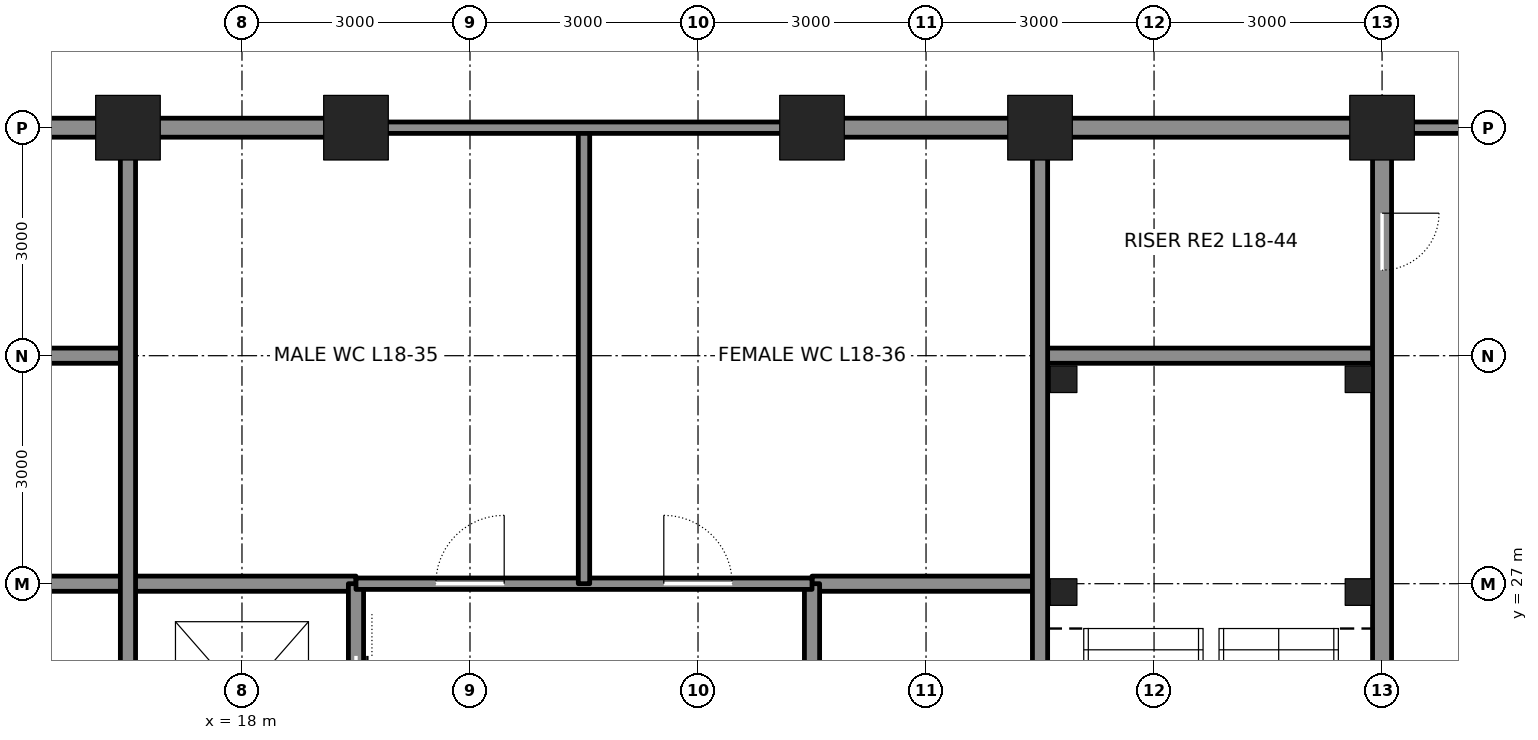
"""IFC4 building model, lengths in metres.
Left out: names, types, materials, properties, quantities, classifications, styles, units other than length and angle.
Written with IfcOpenShell. Run it as: python <this file> out.ifc"""

import sys

from ifc_helpers import new_model, si_unit, direction, frame, frame_2d, origin, origin_2d, place, context, subcontext, project, spatial, rectangle, hollow_rectangle, extrude, element, fill, save


model = new_model("IFC4")
c1 = context("Model", 3, precision=1e-05, world=origin(), true_north=direction((0.0, 1.0)))
c2 = subcontext(c1, "Body", "Model", "MODEL_VIEW")
j1 = project(units=[si_unit("LENGTHUNIT", "METRE"), si_unit("PLANEANGLEUNIT", "RADIAN")], contexts=[c1])
p1 = place(None, origin())
s1 = spatial("IfcSite", under=j1, at=p1, CompositionType="ELEMENT")
p2 = place(p1, origin())
s2 = spatial("IfcBuilding", under=s1, at=p2, CompositionType="ELEMENT")
p3 = place(p2, frame((0.0, 0.0, 87.3)))
s3 = spatial("IfcBuildingStorey", under=s2, at=p3, CompositionType="ELEMENT", Elevation=87.3)
for number, where, z_axis, x_axis in (
    (1, (16.5, 33.0, 0.0), (0.0, 0.0, 1.0), (1.0, 0.0, 0.0)),
    (2, (19.5, 33.0, 0.0), (0.0, 0.0, 1.0), (1.0, 0.0, 0.0)),
    (3, (25.5, 33.0, 0.0), (0.0, 0.0, 1.0), (1.0, 0.0, 0.0)),
    (4, (28.5, 33.0, 0.0), (0.0, 0.0, 1.0), (1.0, 0.0, 0.0)),
    (5, (33.0, 33.0, 0.0), (0.0, 0.0, 1.0), (1.0, 0.0, 0.0)),
):
    element("IfcColumn", number, at=place(p3, frame(where, z_axis=z_axis, x_axis=x_axis)), inside=s3, PredefinedType="COLUMN", context=c2, shape_type="SweptSolid", body=[
        extrude(hollow_rectangle(XDim=0.85, YDim=0.85, WallThickness=0.085, at=origin_2d()), origin(), (0.0, 0.0, 1.0), 4.5),
    ])
p4 = place(p3, frame((12.0, 27.0, 0.0), z_axis=(0.0, 0.0, 1.0), x_axis=(1.0, 0.0, 0.0)))
e6 = element("IfcWall", 6, at=p4, inside=s3, PredefinedType="SOLIDWALL", context=c2, shape_type="SweptSolid", body=[
    extrude(rectangle(XDim=7.5, YDim=0.2, at=frame_2d((3.75, 0.0))), origin(), (0.0, 0.0, 1.0), 4.34),
])
p5 = place(p4, frame((1.65, 0.0, 0.0)))
e7 = element("IfcOpeningElement", 7, at=p5, cuts=e6, PredefinedType="OPENING", context=c2, shape_type="SweptSolid", body=[
    extrude(rectangle(XDim=1.2, YDim=2.1, at=frame_2d((0.6, 1.05))), frame((0.0, 0.11, 0.0), z_axis=(0.0, -1.0, 0.0), x_axis=(1.0, 0.0, 0.0)), (0.0, 0.0, 1.0), 0.22),
])
p6 = place(p3, frame((25.5, 27.0, 0.0), z_axis=(0.0, 0.0, 1.0), x_axis=(1.0, 0.0, 0.0)))
e8 = element("IfcWall", 8, at=p6, inside=s3, PredefinedType="SOLIDWALL", context=c2, shape_type="SweptSolid", body=[
    extrude(rectangle(XDim=3.0, YDim=0.2, at=frame_2d((1.5, 0.0))), origin(), (0.0, 0.0, 1.0), 4.34),
])
for number, where, z_axis, x_axis in (
    (9, (12.0, 30.0, 0.0), (0.0, 0.0, 1.0), (1.0, 0.0, 0.0)),
    (10, (28.5, 30.0, 0.0), (0.0, 0.0, 1.0), (1.0, 0.0, 0.0)),
):
    element("IfcWall", number, at=place(p3, frame(where, z_axis=z_axis, x_axis=x_axis)), inside=s3, PredefinedType="SOLIDWALL", context=c2, shape_type="SweptSolid", body=[
        extrude(rectangle(XDim=4.5, YDim=0.2, at=frame_2d((2.25, 0.0))), origin(), (0.0, 0.0, 1.0), 4.34),
    ])
p7 = place(p3, frame((12.25, 33.0, 0.0), z_axis=(0.0, 0.0, 1.0), x_axis=(1.0, 0.0, 0.0)))
e11 = element("IfcWall", 11, at=p7, inside=s3, PredefinedType="SOLIDWALL", context=c2, shape_type="SweptSolid", body=[
    extrude(rectangle(XDim=4.0, YDim=0.25, at=frame_2d((2.0, 0.0))), origin(), (0.0, 0.0, 1.0), 3.181),
])
for number, where, z_axis, x_axis in (
    (12, (16.75, 33.0, 0.0), (0.0, 0.0, 1.0), (1.0, 0.0, 0.0)),
    (13, (25.75, 33.0, 0.0), (0.0, 0.0, 1.0), (1.0, 0.0, 0.0)),
):
    element("IfcWall", number, at=place(p3, frame(where, z_axis=z_axis, x_axis=x_axis)), inside=s3, PredefinedType="SOLIDWALL", context=c2, shape_type="SweptSolid", body=[
        extrude(rectangle(XDim=2.5, YDim=0.25, at=frame_2d((1.25, 0.0))), origin(), (0.0, 0.0, 1.0), 3.181),
    ])
p8 = place(p3, frame((28.75, 33.0, 0.0), z_axis=(0.0, 0.0, 1.0), x_axis=(1.0, 0.0, 0.0)))
e14 = element("IfcWall", 14, at=p8, inside=s3, PredefinedType="SOLIDWALL", context=c2, shape_type="SweptSolid", body=[
    extrude(rectangle(XDim=4.0, YDim=0.25, at=frame_2d((2.0, 0.0))), origin(), (0.0, 0.0, 1.0), 3.181),
])
p9 = place(p3, frame((16.5, 24.25, 0.0), z_axis=(0.0, 0.0, 1.0), x_axis=(0.0, 1.0, 0.0)))
e15 = element("IfcWall", 15, at=p9, inside=s3, PredefinedType="SOLIDWALL", context=c2, shape_type="SweptSolid", body=[
    extrude(rectangle(XDim=8.5, YDim=0.2, at=frame_2d((4.25, 0.0))), origin(), (0.0, 0.0, 1.0), 3.413),
])
p10 = place(p3, frame((19.5, 15.0, 0.0), z_axis=(0.0, 0.0, 1.0), x_axis=(0.0, 1.0, 0.0)))
e16 = element("IfcWall", 16, at=p10, inside=s3, PredefinedType="SOLIDWALL", context=c2, shape_type="SweptSolid", body=[
    extrude(rectangle(XDim=12.0, YDim=0.2, at=frame_2d((6.0, 0.0))), origin(), (0.0, 0.0, 1.0), 3.365),
])
p11 = place(p10, frame((0.95, 0.0, 0.0)))
e17 = element("IfcOpeningElement", 17, at=p11, cuts=e16, PredefinedType="OPENING", context=c2, shape_type="SweptSolid", body=[
    extrude(rectangle(XDim=1.1, YDim=2.1, at=frame_2d((0.55, 1.05))), frame((0.0, 0.11, 0.0), z_axis=(0.0, -1.0, 0.0), x_axis=(1.0, 0.0, 0.0)), (0.0, 0.0, 1.0), 0.22),
])
p12 = place(p10, frame((3.95, 0.0, 0.0)))
e18 = element("IfcOpeningElement", 18, at=p12, cuts=e16, PredefinedType="OPENING", context=c2, shape_type="SweptSolid", body=[
    extrude(rectangle(XDim=1.1, YDim=2.1, at=frame_2d((0.55, 1.05))), frame((0.0, 0.11, 0.0), z_axis=(0.0, -1.0, 0.0), x_axis=(1.0, 0.0, 0.0)), (0.0, 0.0, 1.0), 0.22),
])
p13 = place(p10, frame((6.95, 0.0, 0.0)))
e19 = element("IfcOpeningElement", 19, at=p13, cuts=e16, PredefinedType="OPENING", context=c2, shape_type="SweptSolid", body=[
    extrude(rectangle(XDim=1.1, YDim=2.1, at=frame_2d((0.55, 1.05))), frame((0.0, 0.11, 0.0), z_axis=(0.0, -1.0, 0.0), x_axis=(1.0, 0.0, 0.0)), (0.0, 0.0, 1.0), 0.22),
])
p14 = place(p10, frame((9.95, 0.0, 0.0)))
e20 = element("IfcOpeningElement", 20, at=p14, cuts=e16, PredefinedType="OPENING", context=c2, shape_type="SweptSolid", body=[
    extrude(rectangle(XDim=1.1, YDim=2.1, at=frame_2d((0.55, 1.05))), frame((0.0, 0.11, 0.0), z_axis=(0.0, -1.0, 0.0), x_axis=(1.0, 0.0, 0.0)), (0.0, 0.0, 1.0), 0.22),
])
p15 = place(p3, frame((25.5, 15.0, 0.0), z_axis=(0.0, 0.0, 1.0), x_axis=(0.0, 1.0, 0.0)))
e21 = element("IfcWall", 21, at=p15, inside=s3, PredefinedType="SOLIDWALL", context=c2, shape_type="SweptSolid", body=[
    extrude(rectangle(XDim=12.0, YDim=0.2, at=frame_2d((6.0, 0.0))), origin(), (0.0, 0.0, 1.0), 3.365),
])
p16 = place(p3, frame((28.5, 24.25, 0.0), z_axis=(0.0, 0.0, 1.0), x_axis=(0.0, 1.0, 0.0)))
e22 = element("IfcWall", 22, at=p16, inside=s3, PredefinedType="SOLIDWALL", context=c2, shape_type="SweptSolid", body=[
    extrude(rectangle(XDim=8.5, YDim=0.2, at=frame_2d((4.25, 0.0))), origin(), (0.0, 0.0, 1.0), 3.413),
])
p17 = place(p3, frame((33.0, 24.25, 0.0), z_axis=(0.0, 0.0, 1.0), x_axis=(0.0, 1.0, 0.0)))
e23 = element("IfcWall", 23, at=p17, inside=s3, PredefinedType="SOLIDWALL", context=c2, shape_type="SweptSolid", body=[
    extrude(rectangle(XDim=8.5, YDim=0.25, at=frame_2d((4.25, 0.0))), origin(), (0.0, 0.0, 1.0), 3.113),
])
p18 = place(p17, frame((6.875, 0.0, 0.0)))
e24 = element("IfcOpeningElement", 24, at=p18, cuts=e23, PredefinedType="OPENING", context=c2, shape_type="SweptSolid", body=[
    extrude(rectangle(XDim=0.75, YDim=2.1, at=frame_2d((0.375, 1.05))), frame((0.0, 0.135, 0.0), z_axis=(0.0, -1.0, 0.0), x_axis=(1.0, 0.0, 0.0)), (0.0, 0.0, 1.0), 0.27),
])
p19 = place(p3, frame((19.5, 27.0, 0.0), z_axis=(0.0, 0.0, 1.0), x_axis=(1.0, 0.0, 0.0)))
e25 = element("IfcWall", 25, at=p19, inside=s3, PredefinedType="PARTITIONING", context=c2, shape_type="SweptSolid", body=[
    extrude(rectangle(XDim=6.0, YDim=0.15, at=frame_2d((3.0, 0.0))), origin(), (0.0, 0.0, 1.0), 4.34),
])
p20 = place(p19, frame((1.05, 0.0, 0.0)))
e26 = element("IfcOpeningElement", 26, at=p20, cuts=e25, PredefinedType="OPENING", context=c2, shape_type="SweptSolid", body=[
    extrude(rectangle(XDim=0.9, YDim=2.1, at=frame_2d((0.45, 1.05))), frame((0.0, 0.085, 0.0), z_axis=(0.0, -1.0, 0.0), x_axis=(1.0, 0.0, 0.0)), (0.0, 0.0, 1.0), 0.17),
])
p21 = place(p19, frame((4.05, 0.0, 0.0)))
e27 = element("IfcOpeningElement", 27, at=p21, cuts=e25, PredefinedType="OPENING", context=c2, shape_type="SweptSolid", body=[
    extrude(rectangle(XDim=0.9, YDim=2.1, at=frame_2d((0.45, 1.05))), frame((0.0, 0.085, 0.0), z_axis=(0.0, -1.0, 0.0), x_axis=(1.0, 0.0, 0.0)), (0.0, 0.0, 1.0), 0.17),
])
p22 = place(p3, frame((22.5, 27.0, 0.0), z_axis=(0.0, 0.0, 1.0), x_axis=(0.0, 1.0, 0.0)))
e28 = element("IfcWall", 28, at=p22, inside=s3, PredefinedType="PARTITIONING", context=c2, shape_type="SweptSolid", body=[
    extrude(rectangle(XDim=6.0, YDim=0.15, at=frame_2d((3.0, 0.0))), origin(), (0.0, 0.0, 1.0), 4.34),
])
p23 = place(p3, frame((19.5, 33.0, 0.0), z_axis=(0.0, 0.0, 1.0), x_axis=(1.0, 0.0, 0.0)))
e29 = element("IfcWall", 29, at=p23, inside=s3, PredefinedType="PARTITIONING", context=c2, shape_type="SweptSolid", body=[
    extrude(rectangle(XDim=6.0, YDim=0.15, at=frame_2d((3.0, 0.0))), origin(), (0.0, 0.0, 1.0), 3.181),
])
p24 = place(p3, frame((33.0, 33.0, -0.3), z_axis=(0.0, 0.0, 1.0), x_axis=(1.0, 0.0, 0.0)))
e30 = element("IfcWall", 30, at=p24, inside=s3, PredefinedType="PARTITIONING", context=c2, shape_type="SweptSolid", body=[
    extrude(rectangle(XDim=1.8, YDim=0.15, at=frame_2d((0.9, 0.0))), origin(), (0.0, 0.0, 1.0), 3.481),
])
for number, where, z_axis, x_axis in (
    (31, (28.81, 29.69, 0.0), (0.0, 0.0, 1.0), (1.0, 0.0, 0.0)),
    (32, (32.69, 29.69, 0.0), (0.0, 0.0, 1.0), (1.0, 0.0, 0.0)),
    (33, (28.81, 26.89, 0.0), (0.0, 0.0, 1.0), (1.0, 0.0, 0.0)),
    (34, (32.69, 26.89, 0.0), (0.0, 0.0, 1.0), (1.0, 0.0, 0.0)),
):
    element("IfcColumn", number, at=place(p3, frame(where, z_axis=z_axis, x_axis=x_axis)), inside=s3, PredefinedType="COLUMN", context=c2, shape_type="SweptSolid", body=[
        extrude(hollow_rectangle(XDim=0.35, YDim=0.35, WallThickness=0.035, at=origin_2d()), origin(), (0.0, 0.0, 1.0), 4.5),
    ])
p25 = place(p18, frame((0.75, 0.0, 0.0), z_axis=(0.0, 0.0, 1.0), x_axis=(-1.0, 0.0, 0.0)))
e35 = element("IfcDoor", 35, at=p25, inside=s3, OperationType="SINGLE_SWING_LEFT", PredefinedType="DOOR", context=c2, shape_type="SweptSolid", body=[
    extrude(rectangle(XDim=0.75, YDim=2.1, at=frame_2d((0.375, 1.05))), frame((0.0, 0.025, 0.0), z_axis=(0.0, -1.0, 0.0), x_axis=(1.0, 0.0, 0.0)), (0.0, 0.0, 1.0), 0.05),
])
fill(e24, e35)
p26 = place(p20, origin())
e36 = element("IfcDoor", 36, at=p26, inside=s3, OperationType="SINGLE_SWING_RIGHT", PredefinedType="DOOR", context=c2, shape_type="SweptSolid", body=[
    extrude(rectangle(XDim=0.9, YDim=2.1, at=frame_2d((0.45, 1.05))), frame((0.0, 0.025, 0.0), z_axis=(0.0, -1.0, 0.0), x_axis=(1.0, 0.0, 0.0)), (0.0, 0.0, 1.0), 0.05),
])
fill(e26, e36)
p27 = place(p21, origin())
e37 = element("IfcDoor", 37, at=p27, inside=s3, OperationType="SINGLE_SWING_LEFT", PredefinedType="DOOR", context=c2, shape_type="SweptSolid", body=[
    extrude(rectangle(XDim=0.9, YDim=2.1, at=frame_2d((0.45, 1.05))), frame((0.0, 0.025, 0.0), z_axis=(0.0, -1.0, 0.0), x_axis=(1.0, 0.0, 0.0)), (0.0, 0.0, 1.0), 0.05),
])
fill(e27, e37)
p28 = place(p14, origin())
e38 = element("IfcDoor", 38, at=p28, inside=s3, OperationType="DOUBLE_DOOR_SLIDING", PredefinedType="DOOR", context=c2, shape_type="SweptSolid", body=[
    extrude(rectangle(XDim=1.1, YDim=2.1, at=frame_2d((0.55, 1.05))), frame((0.0, 0.025, 0.0), z_axis=(0.0, -1.0, 0.0), x_axis=(1.0, 0.0, 0.0)), (0.0, 0.0, 1.0), 0.05),
])
fill(e20, e38)
save(model, sys.argv[1])
